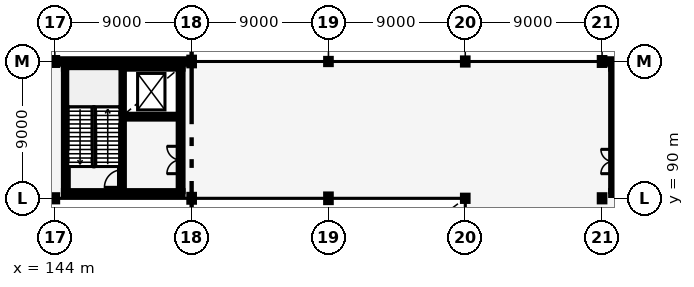
"""IFC4 building model, lengths in metres.
Left out: names, types, materials, properties, quantities, classifications, styles, units other than length and angle.
Written with IfcOpenShell. Run it as: python <this file> out.ifc"""

import sys

from ifc_helpers import new_model, si_unit, direction, frame, frame_2d, origin, origin_2d, place, context, subcontext, project, spatial, rectangle, i_section, extrude, element, fill, save


model = new_model("IFC4")
c1 = context("Model", 3, precision=1e-05, world=origin(), true_north=direction((0.0, 1.0)))
c2 = subcontext(c1, "Body", "Model", "MODEL_VIEW")
j1 = project(units=[si_unit("LENGTHUNIT", "METRE"), si_unit("PLANEANGLEUNIT", "RADIAN")], contexts=[c1])
p1 = place(None, origin())
s1 = spatial("IfcSite", under=j1, at=p1, CompositionType="ELEMENT")
p2 = place(p1, origin())
s2 = spatial("IfcBuilding", under=s1, at=p2, CompositionType="ELEMENT")
p3 = place(p2, frame((0.0, 0.0, 18.0)))
s3 = spatial("IfcBuildingStorey", under=s2, at=p3, CompositionType="ELEMENT", Elevation=18.0)
p4 = place(p3, frame((144.0, 90.0, 0.0), z_axis=(0.0, 0.0, 1.0), x_axis=(1.0, 0.0, 0.0)))
e1 = element("IfcColumn", 1, at=p4, inside=s3, PredefinedType="COLUMN", context=c2, shape_type="SweptSolid", body=[
    extrude(i_section(OverallWidth=0.3, OverallDepth=0.4, WebThickness=0.013, FlangeThickness=0.024, FilletRadius=0.027, at=origin_2d()), origin(), (0.0, 0.0, 1.0), 4.8),
])
for number, where, z_axis, x_axis in (
    (2, (144.0, 99.0, 0.0), (0.0, 0.0, 1.0), (1.0, 0.0, 0.0)),
    (3, (153.0, 90.0, 0.0), (0.0, 0.0, 1.0), (1.0, 0.0, 0.0)),
):
    element("IfcColumn", number, at=place(p3, frame(where, z_axis=z_axis, x_axis=x_axis)), inside=s3, PredefinedType="COLUMN", context=c2, shape_type="SweptSolid", body=[
        extrude(i_section(OverallWidth=0.3, OverallDepth=0.45, WebThickness=0.014, FlangeThickness=0.026, FilletRadius=0.027, at=origin_2d()), origin(), (0.0, 0.0, 1.0), 4.8),
    ])
for number, where, z_axis, x_axis in (
    (4, (153.0, 99.0, 0.0), (0.0, 0.0, 1.0), (1.0, 0.0, 0.0)),
    (5, (162.0, 90.0, 0.0), (0.0, 0.0, 1.0), (1.0, 0.0, 0.0)),
):
    element("IfcColumn", number, at=place(p3, frame(where, z_axis=z_axis, x_axis=x_axis)), inside=s3, PredefinedType="COLUMN", context=c2, shape_type="SweptSolid", body=[
        extrude(i_section(OverallWidth=0.3, OverallDepth=0.5, WebThickness=0.014, FlangeThickness=0.028, FilletRadius=0.027, at=origin_2d()), origin(), (0.0, 0.0, 1.0), 4.8),
    ])
for number, where, z_axis, x_axis in (
    (6, (162.0, 99.0, 0.0), (0.0, 0.0, 1.0), (1.0, 0.0, 0.0)),
    (7, (171.0, 90.0, 0.0), (0.0, 0.0, 1.0), (1.0, 0.0, 0.0)),
):
    element("IfcColumn", number, at=place(p3, frame(where, z_axis=z_axis, x_axis=x_axis)), inside=s3, PredefinedType="COLUMN", context=c2, shape_type="SweptSolid", body=[
        extrude(i_section(OverallWidth=0.3, OverallDepth=0.34, WebThickness=0.012, FlangeThickness=0.021, FilletRadius=0.027, at=origin_2d()), origin(), (0.0, 0.0, 1.0), 4.8),
    ])
for number, where, z_axis, x_axis in (
    (8, (171.0, 99.0, 0.0), (0.0, 0.0, 1.0), (1.0, 0.0, 0.0)),
    (9, (180.0, 90.0, 0.0), (0.0, 0.0, 1.0), (1.0, 0.0, 0.0)),
):
    element("IfcColumn", number, at=place(p3, frame(where, z_axis=z_axis, x_axis=x_axis)), inside=s3, PredefinedType="COLUMN", context=c2, shape_type="SweptSolid", body=[
        extrude(i_section(OverallWidth=0.3, OverallDepth=0.4, WebThickness=0.013, FlangeThickness=0.024, FilletRadius=0.027, at=origin_2d()), origin(), (0.0, 0.0, 1.0), 4.8),
    ])
p5 = place(p3, frame((180.0, 99.0, 0.0), z_axis=(0.0, 0.0, 1.0), x_axis=(1.0, 0.0, 0.0)))
e10 = element("IfcColumn", 10, at=p5, inside=s3, PredefinedType="COLUMN", context=c2, shape_type="SweptSolid", body=[
    extrude(i_section(OverallWidth=0.3, OverallDepth=0.45, WebThickness=0.014, FlangeThickness=0.026, FilletRadius=0.027, at=origin_2d()), origin(), (0.0, 0.0, 1.0), 4.8),
])
p6 = place(p3, frame((144.145, 99.0, 0.0), z_axis=(0.0, 0.0, 1.0), x_axis=(1.0, 0.0, 0.0)))
e11 = element("IfcWall", 11, at=p6, inside=s3, PredefinedType="SOLIDWALL", context=c2, shape_type="SweptSolid", body=[
    extrude(rectangle(XDim=8.71, YDim=0.29, at=frame_2d((4.355, 0.0))), origin(), (0.0, 0.0, 1.0), 3.65),
])
p7 = place(p3, frame((180.145, 99.0, 0.0), z_axis=(0.0, 0.0, 1.0), x_axis=(1.0, 0.0, 0.0)))
e12 = element("IfcWall", 12, at=p7, inside=s3, PredefinedType="SOLIDWALL", context=c2, shape_type="SweptSolid", body=[
    extrude(rectangle(XDim=11.71, YDim=0.29, at=frame_2d((5.855, 0.0))), origin(), (0.0, 0.0, 1.0), 3.65),
])
p8 = place(p3, frame((180.725, 90.47, 0.0), z_axis=(0.0, 0.0, 1.0), x_axis=(0.0, 1.0, 0.0)))
e13 = element("IfcWall", 13, at=p8, inside=s3, PredefinedType="SHEAR", context=c2, shape_type="SweptSolid", body=[
    extrude(rectangle(XDim=8.06, YDim=0.25, at=frame_2d((4.03, 0.0))), origin(), (0.0, 0.0, 1.0), 4.44),
])
p9 = place(p8, frame((1.15, 0.0, 0.0)))
e14 = element("IfcOpeningElement", 14, at=p9, cuts=e13, PredefinedType="OPENING", context=c2, shape_type="SweptSolid", body=[
    extrude(rectangle(XDim=1.6, YDim=2.2, at=frame_2d((0.8, 1.1))), frame((0.0, 0.135, 0.0), z_axis=(0.0, -1.0, 0.0), x_axis=(1.0, 0.0, 0.0)), (0.0, 0.0, 1.0), 0.27),
])
for number, where, z_axis, x_axis in (
    (15, (180.6, 90.345, 0.0), (0.0, 0.0, 1.0), (1.0, 0.0, 0.0)),
    (16, (180.6, 98.655, 0.0), (0.0, 0.0, 1.0), (1.0, 0.0, 0.0)),
):
    element("IfcWall", number, at=place(p3, frame(where, z_axis=z_axis, x_axis=x_axis)), inside=s3, PredefinedType="SHEAR", context=c2, shape_type="SweptSolid", body=[
        extrude(rectangle(XDim=7.8, YDim=0.25, at=frame_2d((3.9, 0.0))), origin(), (0.0, 0.0, 1.0), 4.44),
    ])
p10 = place(p3, frame((144.725, 90.47, 0.0), z_axis=(0.0, 0.0, 1.0), x_axis=(0.0, 1.0, 0.0)))
e17 = element("IfcWall", 17, at=p10, inside=s3, PredefinedType="SHEAR", context=c2, shape_type="SweptSolid", body=[
    extrude(rectangle(XDim=8.06, YDim=0.25, at=frame_2d((4.03, 0.0))), origin(), (0.0, 0.0, 1.0), 4.44),
])
p11 = place(p3, frame((152.275, 90.47, 0.0), z_axis=(0.0, 0.0, 1.0), x_axis=(0.0, 1.0, 0.0)))
e18 = element("IfcWall", 18, at=p11, inside=s3, PredefinedType="SHEAR", context=c2, shape_type="SweptSolid", body=[
    extrude(rectangle(XDim=8.06, YDim=0.25, at=frame_2d((4.03, 0.0))), origin(), (0.0, 0.0, 1.0), 4.44),
])
p12 = place(p11, frame((1.15, 0.0, 0.0)))
e19 = element("IfcOpeningElement", 19, at=p12, cuts=e18, PredefinedType="OPENING", context=c2, shape_type="SweptSolid", body=[
    extrude(rectangle(XDim=1.8, YDim=2.2, at=frame_2d((0.9, 1.1))), frame((0.0, 0.135, 0.0), z_axis=(0.0, -1.0, 0.0), x_axis=(1.0, 0.0, 0.0)), (0.0, 0.0, 1.0), 0.27),
])
for number, where, z_axis, x_axis in (
    (20, (144.6, 90.345, 0.0), (0.0, 0.0, 1.0), (1.0, 0.0, 0.0)),
    (21, (144.6, 98.655, 0.0), (0.0, 0.0, 1.0), (1.0, 0.0, 0.0)),
):
    element("IfcWall", number, at=place(p3, frame(where, z_axis=z_axis, x_axis=x_axis)), inside=s3, PredefinedType="SHEAR", context=c2, shape_type="SweptSolid", body=[
        extrude(rectangle(XDim=7.8, YDim=0.25, at=frame_2d((3.9, 0.0))), origin(), (0.0, 0.0, 1.0), 4.44),
    ])
p13 = place(p3, frame((148.415, 90.47, 0.0), z_axis=(0.0, 0.0, 1.0), x_axis=(0.0, 1.0, 0.0)))
e22 = element("IfcWall", 22, at=p13, inside=s3, PredefinedType="SHEAR", context=c2, shape_type="SweptSolid", body=[
    extrude(rectangle(XDim=8.06, YDim=0.25, at=frame_2d((4.03, 0.0))), origin(), (0.0, 0.0, 1.0), 4.44),
])
p14 = place(p13, frame((0.25, 0.0, 0.0)))
e23 = element("IfcOpeningElement", 23, at=p14, cuts=e22, PredefinedType="OPENING", context=c2, shape_type="SweptSolid", body=[
    extrude(rectangle(XDim=1.15, YDim=2.15, at=frame_2d((0.575, 1.075))), frame((0.0, 0.135, 0.0), z_axis=(0.0, -1.0, 0.0), x_axis=(1.0, 0.0, 0.0)), (0.0, 0.0, 1.0), 0.27),
])
p15 = place(p3, frame((148.54, 95.37, 0.0), z_axis=(0.0, 0.0, 1.0), x_axis=(1.0, 0.0, 0.0)))
e24 = element("IfcWall", 24, at=p15, inside=s3, PredefinedType="SHEAR", context=c2, shape_type="SweptSolid", body=[
    extrude(rectangle(XDim=3.61, YDim=0.25, at=frame_2d((1.805, 0.0))), origin(), (0.0, 0.0, 1.0), 4.44),
])
p16 = place(p15, frame((0.95, 0.0, 0.0)))
e25 = element("IfcOpeningElement", 25, at=p16, cuts=e24, PredefinedType="OPENING", context=c2, shape_type="SweptSolid", body=[
    extrude(rectangle(XDim=1.2, YDim=2.2, at=frame_2d((0.6, 1.1))), frame((0.0, 0.135, 0.0), z_axis=(0.0, -1.0, 0.0), x_axis=(1.0, 0.0, 0.0)), (0.0, 0.0, 1.0), 0.27),
])
p17 = place(p9, origin())
e26 = element("IfcDoor", 26, at=p17, inside=s3, OperationType="DOUBLE_DOOR_SINGLE_SWING", PredefinedType="DOOR", context=c2, shape_type="SweptSolid", body=[
    extrude(rectangle(XDim=1.6, YDim=2.2, at=frame_2d((0.8, 1.1))), frame((0.0, 0.025, 0.0), z_axis=(0.0, -1.0, 0.0), x_axis=(1.0, 0.0, 0.0)), (0.0, 0.0, 1.0), 0.05),
])
fill(e14, e26)
p18 = place(p14, origin())
e27 = element("IfcDoor", 27, at=p18, inside=s3, OperationType="SINGLE_SWING_LEFT", PredefinedType="DOOR", context=c2, shape_type="SweptSolid", body=[
    extrude(rectangle(XDim=1.15, YDim=2.15, at=frame_2d((0.575, 1.075))), frame((0.0, 0.025, 0.0), z_axis=(0.0, -1.0, 0.0), x_axis=(1.0, 0.0, 0.0)), (0.0, 0.0, 1.0), 0.05),
])
fill(e23, e27)
p19 = place(p16, origin())
e28 = element("IfcDoor", 28, at=p19, inside=s3, OperationType="DOUBLE_DOOR_SLIDING", PredefinedType="DOOR", context=c2, shape_type="SweptSolid", body=[
    extrude(rectangle(XDim=1.2, YDim=2.2, at=frame_2d((0.6, 1.1))), frame((0.0, 0.025, 0.0), z_axis=(0.0, -1.0, 0.0), x_axis=(1.0, 0.0, 0.0)), (0.0, 0.0, 1.0), 0.05),
])
fill(e25, e28)
p20 = place(p12, origin())
e29 = element("IfcDoor", 29, at=p20, inside=s3, OperationType="DOUBLE_DOOR_SINGLE_SWING", PredefinedType="DOOR", context=c2, shape_type="SweptSolid", body=[
    extrude(rectangle(XDim=1.8, YDim=2.2, at=frame_2d((0.9, 1.1))), frame((0.0, 0.025, 0.0), z_axis=(0.0, -1.0, 0.0), x_axis=(1.0, 0.0, 0.0)), (0.0, 0.0, 1.0), 0.05),
])
fill(e19, e29)
save(model, sys.argv[1])
